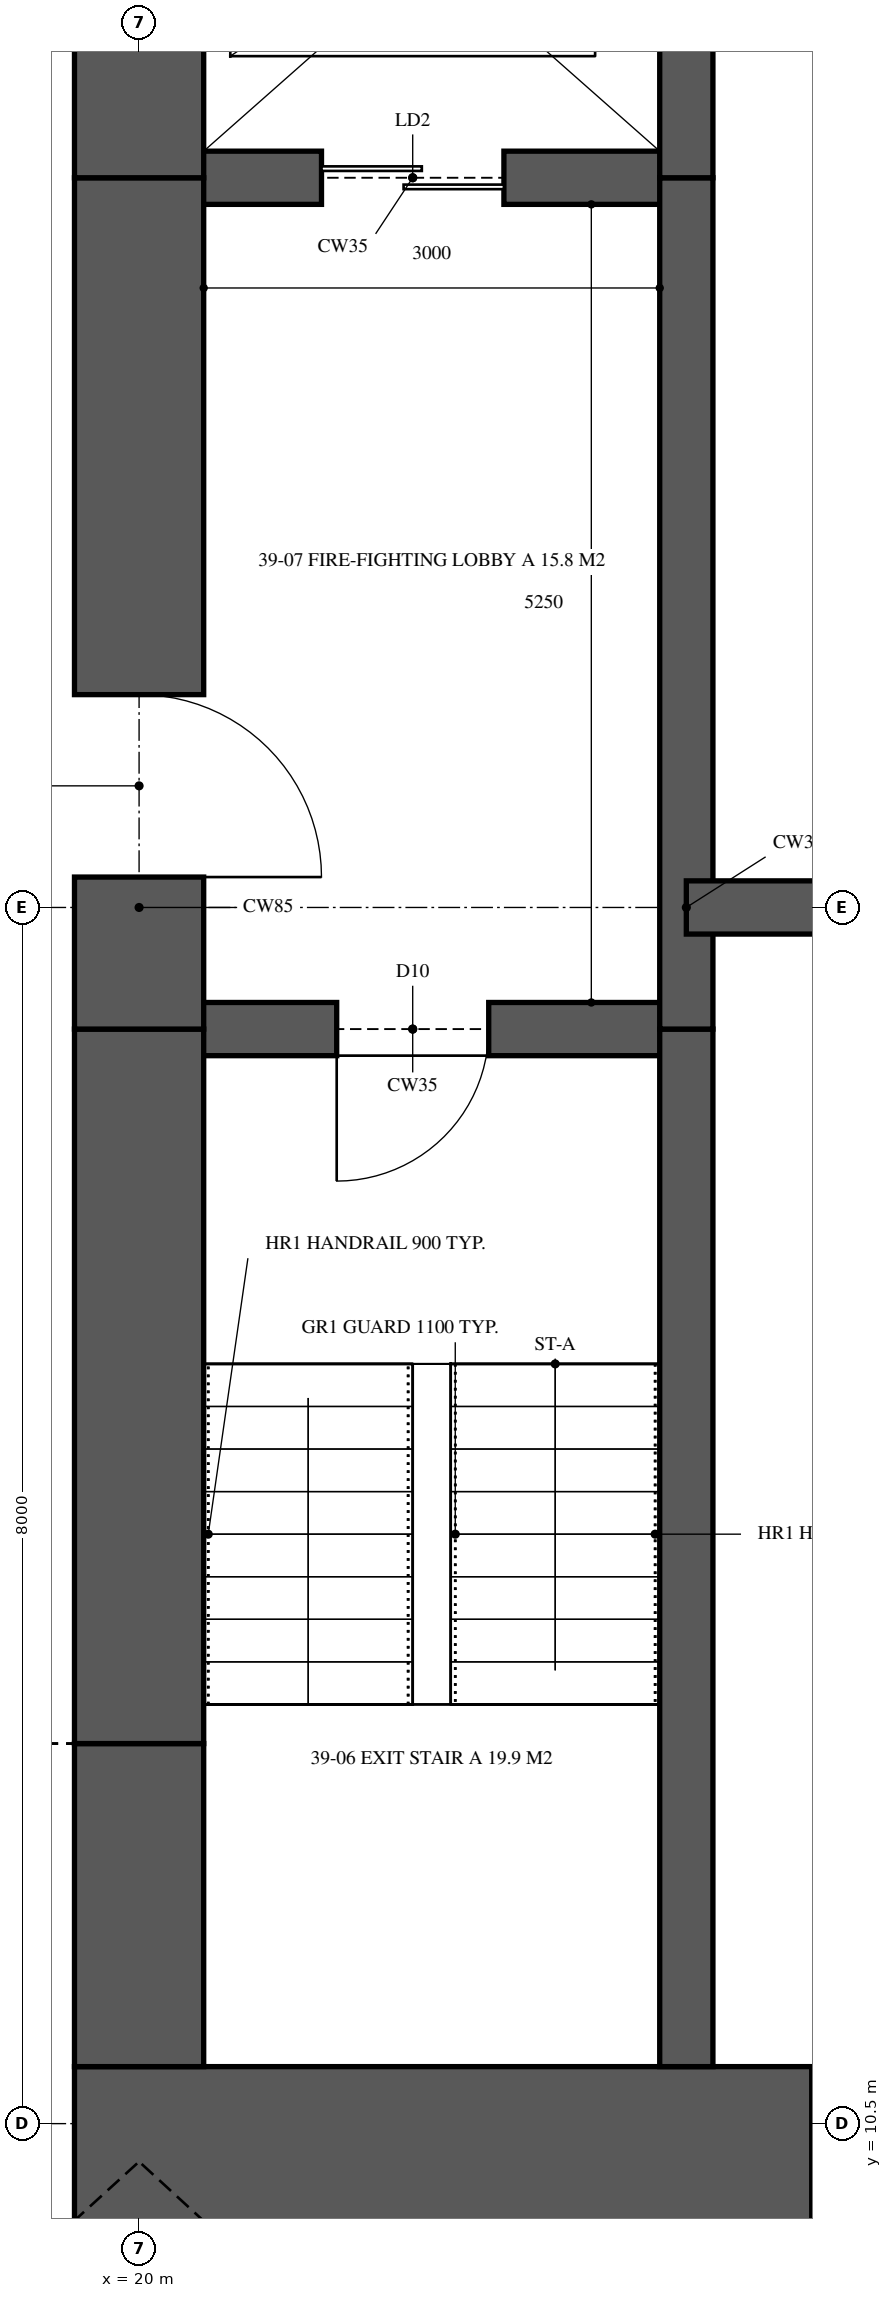
"""IFC4 building model, lengths in metres.
Left out: names, types, materials, properties, quantities, classifications, styles, units other than length and angle.
Written with IfcOpenShell. Run it as: python <this file> out.ifc"""

import sys

from ifc_helpers import new_model, si_unit, direction, frame, frame_2d, origin, place, context, subcontext, project, spatial, rectangle, extrude, element, fill, save


model = new_model("IFC4")
c1 = context("Model", 3, precision=1e-05, world=origin(), true_north=direction((0.0, 1.0)))
c2 = subcontext(c1, "Body", "Model", "MODEL_VIEW")
j1 = project(units=[si_unit("LENGTHUNIT", "METRE"), si_unit("PLANEANGLEUNIT", "RADIAN")], contexts=[c1])
p1 = place(None, origin())
s1 = spatial("IfcSite", under=j1, at=p1, CompositionType="ELEMENT")
p2 = place(p1, origin())
s2 = spatial("IfcBuilding", under=s1, at=p2, CompositionType="ELEMENT")
p3 = place(p2, frame((0.0, 0.0, 144.35)))
s3 = spatial("IfcBuildingStorey", under=s2, at=p3, CompositionType="ELEMENT", Elevation=144.35)
p4 = place(p3, frame((19.575, 10.125, 0.0), z_axis=(0.0, 0.0, 1.0), x_axis=(1.0, 0.0, 0.0)))
e1 = element("IfcWall", 1, at=p4, inside=s3, PredefinedType="SHEAR", context=c2, shape_type="SweptSolid", body=[
    extrude(rectangle(XDim=6.425, YDim=1.5, at=frame_2d((3.212, 0.0))), origin(), (0.0, 0.0, 1.0), 5.0),
])
p5 = place(p4, frame((4.85, 0.0, 0.0)))
e2 = element("IfcOpeningElement", 2, at=p5, cuts=e1, PredefinedType="OPENING", context=c2, shape_type="SweptSolid", body=[
    extrude(rectangle(XDim=0.75, YDim=2.1, at=frame_2d((0.375, 1.05))), frame((0.0, 0.76, 0.0), z_axis=(0.0, -1.0, 0.0), x_axis=(1.0, 0.0, 0.0)), (0.0, 0.0, 1.0), 1.52),
])
p6 = place(p3, frame((20.0, 26.125, 0.0), z_axis=(0.0, 0.0, 1.0), x_axis=(0.0, -1.0, 0.0)))
e3 = element("IfcWall", 3, at=p6, inside=s3, PredefinedType="SHEAR", context=c2, shape_type="SweptSolid", body=[
    extrude(rectangle(XDim=2.825, YDim=0.85, at=frame_2d((1.413, 0.0))), origin(), (0.0, 0.0, 1.0), 5.0),
])
p7 = place(p3, frame((20.0, 23.3, 0.0), z_axis=(0.0, 0.0, 1.0), x_axis=(0.0, -1.0, 0.0)))
e4 = element("IfcWall", 4, at=p7, inside=s3, PredefinedType="SHEAR", context=c2, shape_type="SweptSolid", body=[
    extrude(rectangle(XDim=5.6, YDim=0.85, at=frame_2d((2.8, 0.0))), origin(), (0.0, 0.0, 1.0), 5.0),
])
p8 = place(p7, frame((3.4, 0.0, 0.0)))
e5 = element("IfcOpeningElement", 5, at=p8, cuts=e4, PredefinedType="OPENING", context=c2, shape_type="SweptSolid", body=[
    extrude(rectangle(XDim=1.2, YDim=2.2, at=frame_2d((0.6, 1.1))), frame((0.0, 0.435, 0.0), z_axis=(0.0, -1.0, 0.0), x_axis=(1.0, 0.0, 0.0)), (0.0, 0.0, 1.0), 0.87),
])
p9 = place(p3, frame((20.0, 17.7, 0.0), z_axis=(0.0, 0.0, 1.0), x_axis=(0.0, -1.0, 0.0)))
e6 = element("IfcWall", 6, at=p9, inside=s3, PredefinedType="SHEAR", context=c2, shape_type="SweptSolid", body=[
    extrude(rectangle(XDim=4.7, YDim=0.85, at=frame_2d((2.35, 0.0))), origin(), (0.0, 0.0, 1.0), 5.0),
])
p10 = place(p3, frame((20.0, 13.0, 0.0), z_axis=(0.0, 0.0, 1.0), x_axis=(0.0, -1.0, 0.0)))
e7 = element("IfcWall", 7, at=p10, inside=s3, PredefinedType="SHEAR", context=c2, shape_type="SweptSolid", body=[
    extrude(rectangle(XDim=2.125, YDim=0.85, at=frame_2d((1.062, 0.0))), origin(), (0.0, 0.0, 1.0), 5.0),
])
p11 = place(p3, frame((23.6, 10.875, 0.0), z_axis=(0.0, 0.0, 1.0), x_axis=(0.0, 1.0, 0.0)))
e8 = element("IfcWall", 8, at=p11, inside=s3, PredefinedType="SHEAR", context=c2, shape_type="SweptSolid", body=[
    extrude(rectangle(XDim=6.825, YDim=0.35, at=frame_2d((3.413, 0.0))), origin(), (0.0, 0.0, 1.0), 5.0),
])
p12 = place(p3, frame((23.6, 17.7, 0.0), z_axis=(0.0, 0.0, 1.0), x_axis=(0.0, 1.0, 0.0)))
e9 = element("IfcWall", 9, at=p12, inside=s3, PredefinedType="SHEAR", context=c2, shape_type="SweptSolid", body=[
    extrude(rectangle(XDim=5.6, YDim=0.35, at=frame_2d((2.8, 0.0))), origin(), (0.0, 0.0, 1.0), 5.0),
])
p13 = place(p3, frame((23.6, 23.3, 0.0), z_axis=(0.0, 0.0, 1.0), x_axis=(0.0, 1.0, 0.0)))
e10 = element("IfcWall", 10, at=p13, inside=s3, PredefinedType="SHEAR", context=c2, shape_type="SweptSolid", body=[
    extrude(rectangle(XDim=2.825, YDim=0.35, at=frame_2d((1.413, 0.0))), origin(), (0.0, 0.0, 1.0), 5.0),
])
p14 = place(p3, frame((20.0, 17.7, 0.0), z_axis=(0.0, 0.0, 1.0), x_axis=(1.0, 0.0, 0.0)))
e11 = element("IfcWall", 11, at=p14, inside=s3, PredefinedType="SHEAR", context=c2, shape_type="SweptSolid", body=[
    extrude(rectangle(XDim=3.6, YDim=0.35, at=frame_2d((1.8, 0.0))), origin(), (0.0, 0.0, 1.0), 5.0),
])
p15 = place(p14, frame((1.3, 0.0, 0.0)))
e12 = element("IfcOpeningElement", 12, at=p15, cuts=e11, PredefinedType="OPENING", context=c2, shape_type="SweptSolid", body=[
    extrude(rectangle(XDim=1.0, YDim=2.1, at=frame_2d((0.5, 1.05))), frame((0.0, 0.185, 0.0), z_axis=(0.0, -1.0, 0.0), x_axis=(1.0, 0.0, 0.0)), (0.0, 0.0, 1.0), 0.37),
])
p16 = place(p3, frame((20.0, 23.3, 0.0), z_axis=(0.0, 0.0, 1.0), x_axis=(1.0, 0.0, 0.0)))
e13 = element("IfcWall", 13, at=p16, inside=s3, PredefinedType="SHEAR", context=c2, shape_type="SweptSolid", body=[
    extrude(rectangle(XDim=3.6, YDim=0.35, at=frame_2d((1.8, 0.0))), origin(), (0.0, 0.0, 1.0), 5.0),
])
p17 = place(p16, frame((1.2, 0.0, 0.0)))
e14 = element("IfcOpeningElement", 14, at=p17, cuts=e13, PredefinedType="OPENING", context=c2, shape_type="SweptSolid", body=[
    extrude(rectangle(XDim=1.2, YDim=2.1, at=frame_2d((0.6, 1.05))), frame((0.0, 0.185, 0.0), z_axis=(0.0, -1.0, 0.0), x_axis=(1.0, 0.0, 0.0)), (0.0, 0.0, 1.0), 0.37),
])
p18 = place(p3, frame((23.6, 18.5, 0.0), z_axis=(0.0, 0.0, 1.0), x_axis=(1.0, 0.0, 0.0)))
e15 = element("IfcWall", 15, at=p18, inside=s3, PredefinedType="SHEAR", context=c2, shape_type="SweptSolid", body=[
    extrude(rectangle(XDim=2.4, YDim=0.35, at=frame_2d((1.2, 0.0))), origin(), (0.0, 0.0, 1.0), 5.0),
])
p19 = place(p15, frame((1.0, 0.0, 0.0), z_axis=(0.0, 0.0, 1.0), x_axis=(-1.0, 0.0, 0.0)))
e16 = element("IfcDoor", 16, at=p19, inside=s3, OperationType="SINGLE_SWING_RIGHT", PredefinedType="DOOR", context=c2, shape_type="SweptSolid", body=[
    extrude(rectangle(XDim=1.0, YDim=2.1, at=frame_2d((0.5, 1.05))), frame((0.0, 0.025, 0.0), z_axis=(0.0, -1.0, 0.0), x_axis=(1.0, 0.0, 0.0)), (0.0, 0.0, 1.0), 0.05),
])
fill(e12, e16)
p20 = place(p8, origin())
e17 = element("IfcDoor", 17, at=p20, inside=s3, OperationType="SINGLE_SWING_RIGHT", PredefinedType="DOOR", context=c2, shape_type="SweptSolid", body=[
    extrude(rectangle(XDim=1.2, YDim=2.2, at=frame_2d((0.6, 1.1))), frame((0.0, 0.025, 0.0), z_axis=(0.0, -1.0, 0.0), x_axis=(1.0, 0.0, 0.0)), (0.0, 0.0, 1.0), 0.05),
])
fill(e5, e17)
p21 = place(p17, origin())
e18 = element("IfcDoor", 18, at=p21, inside=s3, OperationType="SLIDING_TO_LEFT", PredefinedType="DOOR", context=c2, shape_type="SweptSolid", body=[
    extrude(rectangle(XDim=1.2, YDim=2.1, at=frame_2d((0.6, 1.05))), frame((0.0, 0.025, 0.0), z_axis=(0.0, -1.0, 0.0), x_axis=(1.0, 0.0, 0.0)), (0.0, 0.0, 1.0), 0.05),
])
fill(e14, e18)
save(model, sys.argv[1])
